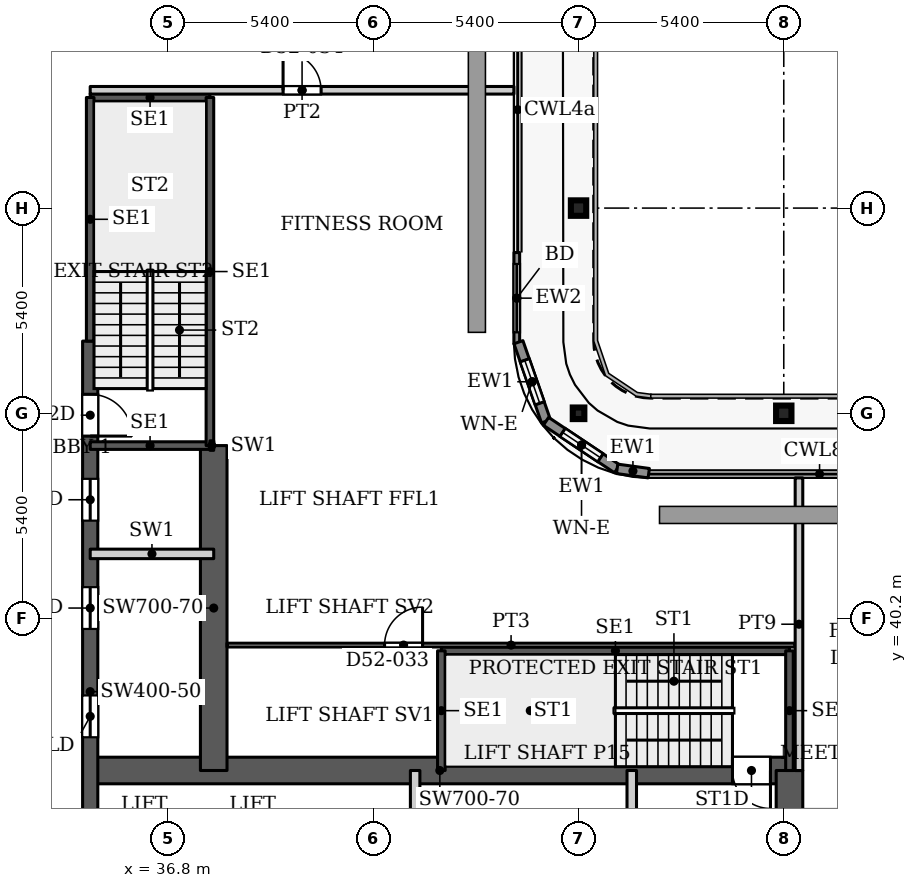
"""IFC4 building model, lengths in metres.
Left out: names, types, materials, properties, quantities, classifications, styles, units other than length and angle.
Written with IfcOpenShell. Run it as: python <this file> out.ifc"""

import sys

from ifc_helpers import new_model, si_unit, direction, frame, frame_2d, origin, origin_2d, place, context, subcontext, project, spatial, rectangle, hollow_rectangle, i_section, extrude, source, transform, mapped, element, fill, save


model = new_model("IFC4")
c1 = context("Model", 3, precision=1e-05, world=origin(), true_north=direction((0.0, 1.0)))
c2 = subcontext(c1, "Body", "Model", "MODEL_VIEW")
j1 = project(units=[si_unit("LENGTHUNIT", "METRE"), si_unit("PLANEANGLEUNIT", "RADIAN")], contexts=[c1])
p1 = place(None, origin())
s1 = spatial("IfcSite", under=j1, at=p1, CompositionType="ELEMENT")
p2 = place(p1, origin())
s2 = spatial("IfcBuilding", under=s1, at=p2, CompositionType="ELEMENT")
p3 = place(p2, frame((0.0, 0.0, 224.0)))
s3 = spatial("IfcBuildingStorey", under=s2, at=p3, CompositionType="ELEMENT", Elevation=224.0)
for number, where, z_axis, x_axis in (
    (1, (53.0, 45.6, 0.0), (0.0, 0.0, 1.0), (1.0, 0.0, 0.0)),
    (2, (47.6, 51.0, 0.0), (0.0, 0.0, 1.0), (1.0, 0.0, 0.0)),
):
    element("IfcColumn", number, at=place(p3, frame(where, z_axis=z_axis, x_axis=x_axis)), inside=s3, PredefinedType="COLUMN", context=c2, shape_type="SweptSolid", body=[
        extrude(i_section(OverallWidth=0.404, OverallDepth=0.407, WebThickness=0.027, FlangeThickness=0.044, FilletRadius=0.012, at=origin_2d()), origin(), (0.0, 0.0, 1.0), 3.9),
    ])
p4 = place(p3, frame((47.6, 45.6, 0.0), z_axis=(0.0, 0.0, 1.0), x_axis=(1.0, 0.0, 0.0)))
e3 = element("IfcColumn", 3, at=p4, inside=s3, PredefinedType="COLUMN", context=c2, shape_type="SweptSolid", body=[
    extrude(hollow_rectangle(XDim=0.305, YDim=0.305, WallThickness=0.016, InnerFilletRadius=0.016, OuterFilletRadius=0.032, at=origin_2d()), origin(), (0.0, 0.0, 1.0), 3.9),
])
p5 = place(p3, frame((34.75, 36.2, 0.0), z_axis=(0.0, 0.0, 1.0), x_axis=(1.0, 0.0, 0.0)))
e4 = element("IfcWall", 4, at=p5, inside=s3, PredefinedType="SHEAR", context=c2, shape_type="SweptSolid", body=[
    extrude(rectangle(XDim=18.4, YDim=0.7, at=frame_2d((9.2, 0.0))), origin(), (0.0, 0.0, 1.0), 3.9),
])
p6 = place(p5, frame((16.9, 0.0, 0.0)))
e5 = element("IfcOpeningElement", 5, at=p6, cuts=e4, PredefinedType="OPENING", context=c2, shape_type="SweptSolid", body=[
    extrude(rectangle(XDim=1.0, YDim=2.2, at=frame_2d((0.5, 1.1))), frame((0.0, 0.36, 0.0), z_axis=(0.0, -1.0, 0.0), x_axis=(1.0, 0.0, 0.0)), (0.0, 0.0, 1.0), 0.72),
])
p7 = place(p3, frame((34.75, 29.05, 0.0), z_axis=(0.0, 0.0, 1.0), x_axis=(0.0, 1.0, 0.0)))
e6 = element("IfcWall", 6, at=p7, inside=s3, PredefinedType="SHEAR", context=c2, shape_type="SweptSolid", body=[
    extrude(rectangle(XDim=18.45, YDim=0.4, at=frame_2d((9.225, 0.0))), origin(), (0.0, 0.0, 1.0), 3.9),
])
p8 = place(p7, frame((8.025, 0.0, 0.0)))
e7 = element("IfcOpeningElement", 7, at=p8, cuts=e6, PredefinedType="OPENING", context=c2, shape_type="SweptSolid", body=[
    extrude(rectangle(XDim=1.1, YDim=2.2, at=frame_2d((0.55, 1.1))), frame((0.0, 0.21, 0.0), z_axis=(0.0, -1.0, 0.0), x_axis=(1.0, 0.0, 0.0)), (0.0, 0.0, 1.0), 0.42),
])
p9 = place(p7, frame((10.875, 0.0, 0.0)))
e8 = element("IfcOpeningElement", 8, at=p9, cuts=e6, PredefinedType="OPENING", context=c2, shape_type="SweptSolid", body=[
    extrude(rectangle(XDim=1.1, YDim=2.2, at=frame_2d((0.55, 1.1))), frame((0.0, 0.21, 0.0), z_axis=(0.0, -1.0, 0.0), x_axis=(1.0, 0.0, 0.0)), (0.0, 0.0, 1.0), 0.42),
])
p10 = place(p7, frame((13.725, 0.0, 0.0)))
e9 = element("IfcOpeningElement", 9, at=p10, cuts=e6, PredefinedType="OPENING", context=c2, shape_type="SweptSolid", body=[
    extrude(rectangle(XDim=1.1, YDim=2.2, at=frame_2d((0.55, 1.1))), frame((0.0, 0.21, 0.0), z_axis=(0.0, -1.0, 0.0), x_axis=(1.0, 0.0, 0.0)), (0.0, 0.0, 1.0), 0.42),
])
p11 = place(p7, frame((15.95, 0.0, 0.0)))
e10 = element("IfcOpeningElement", 10, at=p11, cuts=e6, PredefinedType="OPENING", context=c2, shape_type="SweptSolid", body=[
    extrude(rectangle(XDim=1.1, YDim=2.2, at=frame_2d((0.55, 1.1))), frame((0.0, 0.21, 0.0), z_axis=(0.0, -1.0, 0.0), x_axis=(1.0, 0.0, 0.0)), (0.0, 0.0, 1.0), 0.42),
])
p12 = place(p3, frame((38.0, 36.2, 0.0), z_axis=(0.0, 0.0, 1.0), x_axis=(0.0, 1.0, 0.0)))
e11 = element("IfcWall", 11, at=p12, inside=s3, PredefinedType="SHEAR", context=c2, shape_type="SweptSolid", body=[
    extrude(rectangle(XDim=8.55, YDim=0.7, at=frame_2d((4.275, 0.0))), origin(), (0.0, 0.0, 1.0), 3.9),
])
p13 = place(p3, frame((53.15, 25.8, 0.0), z_axis=(0.0, 0.0, 1.0), x_axis=(0.0, 1.0, 0.0)))
e12 = element("IfcWall", 12, at=p13, inside=s3, PredefinedType="SHEAR", context=c2, shape_type="SweptSolid", body=[
    extrude(rectangle(XDim=10.4, YDim=0.7, at=frame_2d((5.2, 0.0))), origin(), (0.0, 0.0, 1.0), 3.9),
])
p14 = place(p3, frame((45.975, 49.83, 0.0), z_axis=(0.0, 0.0, 1.0), x_axis=(0.0, -1.0, 0.0)))
e13 = element("IfcWall", 13, at=p14, inside=s3, PredefinedType="SOLIDWALL", context=c2, shape_type="SweptSolid", body=[
    extrude(rectangle(XDim=2.4, YDim=0.15, at=frame_2d((1.2, 0.0))), origin(), (0.0, 0.0, 1.0), 3.75),
])
p15 = place(p14, frame((0.3, 0.0, 0.0)))
e14 = element("IfcOpeningElement", 14, at=p15, cuts=e13, PredefinedType="OPENING", context=c2, shape_type="SweptSolid", body=[
    extrude(rectangle(XDim=1.8, YDim=2.4, at=frame_2d((0.9, 1.2))), frame((0.0, 0.085, 0.0), z_axis=(0.0, -1.0, 0.0), x_axis=(1.0, 0.0, 0.0)), (0.0, 0.0, 1.0), 0.17),
])
p16 = place(p3, frame((46.018, 47.471, 0.0), z_axis=(0.0, 0.0, 1.0), x_axis=(0.328791208903, -0.944402637093, 0.0)))
e15 = element("IfcWall", 15, at=p16, inside=s3, PredefinedType="SOLIDWALL", context=c2, shape_type="SweptSolid", body=[
    extrude(rectangle(XDim=2.205, YDim=0.25, at=frame_2d((1.102, 0.0))), origin(), (0.0, 0.0, 1.0), 3.75),
])
p17 = place(p16, frame((0.503, 0.0, 0.6)))
e16 = element("IfcOpeningElement", 16, at=p17, cuts=e15, PredefinedType="OPENING", context=c2, shape_type="SweptSolid", body=[
    extrude(rectangle(XDim=1.2, YDim=2.1, at=frame_2d((0.6, 1.05))), frame((0.0, 0.135, 0.0), z_axis=(0.0, -1.0, 0.0), x_axis=(1.0, 0.0, 0.0)), (0.0, 0.0, 1.0), 0.27),
])
p18 = place(p3, frame((46.743, 45.389, 0.0), z_axis=(0.0, 0.0, 1.0), x_axis=(0.831449265529, -0.555600682912, 0.0)))
e17 = element("IfcWall", 17, at=p18, inside=s3, PredefinedType="SOLIDWALL", context=c2, shape_type="SweptSolid", body=[
    extrude(rectangle(XDim=2.251, YDim=0.25, at=frame_2d((1.126, 0.0))), origin(), (0.0, 0.0, 1.0), 3.75),
])
p19 = place(p18, frame((0.525, 0.0, 0.6)))
e18 = element("IfcOpeningElement", 18, at=p19, cuts=e17, PredefinedType="OPENING", context=c2, shape_type="SweptSolid", body=[
    extrude(rectangle(XDim=1.2, YDim=2.1, at=frame_2d((0.6, 1.05))), frame((0.0, 0.135, 0.0), z_axis=(0.0, -1.0, 0.0), x_axis=(1.0, 0.0, 0.0)), (0.0, 0.0, 1.0), 0.27),
])
p20 = place(p3, frame((48.615, 44.138, 0.0), z_axis=(0.0, 0.0, 1.0), x_axis=(0.990741504246, -0.135761819977, 0.0)))
e19 = element("IfcWall", 19, at=p20, inside=s3, PredefinedType="SOLIDWALL", context=c2, shape_type="SweptSolid", body=[
    extrude(rectangle(XDim=0.84, YDim=0.25, at=frame_2d((0.42, 0.0))), origin(), (0.0, 0.0, 1.0), 3.75),
])
p21 = place(p3, frame((43.99, 39.35, 0.0), z_axis=(0.0, 0.0, 1.0), x_axis=(1.0, 0.0, 0.0)))
e20 = element("IfcWall", 20, at=p21, inside=s3, PredefinedType="SHEAR", context=c2, shape_type="SweptSolid", body=[
    extrude(rectangle(XDim=9.16, YDim=0.2, at=frame_2d((4.58, 0.0))), origin(), (0.0, 0.0, 1.0), 3.9),
])
for number, where, z_axis, x_axis in (
    (21, (43.99, 36.2, 0.0), (0.0, 0.0, 1.0), (0.0, 1.0, 0.0)),
    (22, (53.15, 36.2, 0.0), (0.0, 0.0, 1.0), (0.0, 1.0, 0.0)),
):
    element("IfcWall", number, at=place(p3, frame(where, z_axis=z_axis, x_axis=x_axis)), inside=s3, PredefinedType="SHEAR", context=c2, shape_type="SweptSolid", body=[
        extrude(rectangle(XDim=3.15, YDim=0.2, at=frame_2d((1.575, 0.0))), origin(), (0.0, 0.0, 1.0), 3.9),
    ])
for number, where, z_axis, x_axis in (
    (23, (34.75, 44.75, 0.0), (0.0, 0.0, 1.0), (1.0, 0.0, 0.0)),
    (24, (34.75, 53.91, 0.0), (0.0, 0.0, 1.0), (1.0, 0.0, 0.0)),
):
    element("IfcWall", number, at=place(p3, frame(where, z_axis=z_axis, x_axis=x_axis)), inside=s3, PredefinedType="SHEAR", context=c2, shape_type="SweptSolid", body=[
        extrude(rectangle(XDim=3.15, YDim=0.2, at=frame_2d((1.575, 0.0))), origin(), (0.0, 0.0, 1.0), 3.9),
    ])
p22 = place(p3, frame((34.75, 47.5, 0.0), z_axis=(0.0, 0.0, 1.0), x_axis=(0.0, 1.0, 0.0)))
e25 = element("IfcWall", 25, at=p22, inside=s3, PredefinedType="SHEAR", context=c2, shape_type="SweptSolid", body=[
    extrude(rectangle(XDim=6.41, YDim=0.2, at=frame_2d((3.205, 0.0))), origin(), (0.0, 0.0, 1.0), 3.9),
])
p23 = place(p3, frame((37.9, 44.75, 0.0), z_axis=(0.0, 0.0, 1.0), x_axis=(0.0, 1.0, 0.0)))
e26 = element("IfcWall", 26, at=p23, inside=s3, PredefinedType="SHEAR", context=c2, shape_type="SweptSolid", body=[
    extrude(rectangle(XDim=9.16, YDim=0.2, at=frame_2d((4.58, 0.0))), origin(), (0.0, 0.0, 1.0), 3.9),
])
for number, where, z_axis, x_axis in (
    (27, (43.3, 32.95, 0.0), (0.0, 0.0, 1.0), (0.0, 1.0, 0.0)),
    (28, (49.0, 32.95, 0.0), (0.0, 0.0, 1.0), (0.0, 1.0, 0.0)),
    (29, (34.75, 41.9, 0.0), (0.0, 0.0, 1.0), (1.0, 0.0, 0.0)),
):
    element("IfcWall", number, at=place(p3, frame(where, z_axis=z_axis, x_axis=x_axis)), inside=s3, PredefinedType="PARTITIONING", context=c2, shape_type="SweptSolid", body=[
        extrude(rectangle(XDim=3.25, YDim=0.25, at=frame_2d((1.625, 0.0))), origin(), (0.0, 0.0, 1.0), 3.9),
    ])
p24 = place(p3, frame((37.9, 44.75, 0.0), z_axis=(0.0, 0.0, 1.0), x_axis=(1.0, 0.0, 0.0)))
e30 = element("IfcWall", 30, at=p24, inside=s3, PredefinedType="PARTITIONING", context=c2, shape_type="SweptSolid", body=[
    extrude(rectangle(XDim=0.1, YDim=0.25, at=frame_2d((0.05, 0.0))), origin(), (0.0, 0.0, 1.0), 3.9),
])
p25 = place(p3, frame((34.75, 54.1, 0.0), z_axis=(0.0, 0.0, 1.0), x_axis=(1.0, 0.0, 0.0)))
e31 = element("IfcWall", 31, at=p25, inside=s3, PredefinedType="PARTITIONING", context=c2, shape_type="SweptSolid", body=[
    extrude(rectangle(XDim=11.15, YDim=0.2, at=frame_2d((5.575, 0.0))), origin(), (0.0, 0.0, 1.0), 3.6),
])
p26 = place(p25, frame((5.075, 0.0, 0.0)))
e32 = element("IfcOpeningElement", 32, at=p26, cuts=e31, PredefinedType="OPENING", context=c2, shape_type="SweptSolid", body=[
    extrude(rectangle(XDim=1.0, YDim=2.1, at=frame_2d((0.5, 1.05))), frame((0.0, 0.11, 0.0), z_axis=(0.0, -1.0, 0.0), x_axis=(1.0, 0.0, 0.0)), (0.0, 0.0, 1.0), 0.22),
])
p27 = place(p3, frame((38.349, 39.5, 0.0), z_axis=(0.0, 0.0, 1.0), x_axis=(1.0, 0.0, 0.0)))
e33 = element("IfcWall", 33, at=p27, inside=s3, PredefinedType="PARTITIONING", context=c2, shape_type="SweptSolid", body=[
    extrude(rectangle(XDim=14.951, YDim=0.1, at=frame_2d((7.476, 0.0))), origin(), (0.0, 0.0, 1.0), 3.6),
])
p28 = place(p27, frame((4.147, 0.0, 0.0)))
e34 = element("IfcOpeningElement", 34, at=p28, cuts=e33, PredefinedType="OPENING", context=c2, shape_type="SweptSolid", body=[
    extrude(rectangle(XDim=1.0, YDim=2.1, at=frame_2d((0.5, 1.05))), frame((0.0, 0.06, 0.0), z_axis=(0.0, -1.0, 0.0), x_axis=(1.0, 0.0, 0.0)), (0.0, 0.0, 1.0), 0.12),
])
p29 = place(p3, frame((53.4, 36.199, 0.0), z_axis=(0.0, 0.0, 1.0), x_axis=(0.0, 1.0, 0.0)))
e35 = element("IfcWall", 35, at=p29, inside=s3, PredefinedType="PARTITIONING", context=c2, shape_type="SweptSolid", body=[
    extrude(rectangle(XDim=7.701, YDim=0.2, at=frame_2d((3.851, 0.0))), origin(), (0.0, 0.0, 1.0), 3.6),
])
m1 = source(origin(), c2, "Body", "SweptSolid", [
    extrude(rectangle(XDim=1.8, YDim=2.4, at=frame_2d((0.9, 1.2))), frame((0.0, 0.025, 0.0), z_axis=(0.0, -1.0, 0.0), x_axis=(1.0, 0.0, 0.0)), (0.0, 0.0, 1.0), 0.05),
])
p30 = place(p15, origin())
e36 = element("IfcDoor", 36, at=p30, inside=s3, OperationType="SLIDING_TO_LEFT", PredefinedType="DOOR", context=c2, shape_type="MappedRepresentation", body=[
    mapped(m1, transform((0.0, 0.0, 0.0), x_axis=(1.0, 0.0, 0.0), y_axis=(0.0, 1.0, 0.0), z_axis=(0.0, 0.0, 1.0), scale=1.0)),
])
fill(e14, e36)
m2 = source(origin(), c2, "Body", "SweptSolid", [
    extrude(rectangle(XDim=1.2, YDim=2.1, at=frame_2d((0.6, 1.05))), frame((0.0, 0.03, 0.0), z_axis=(0.0, -1.0, 0.0), x_axis=(1.0, 0.0, 0.0)), (0.0, 0.0, 1.0), 0.06),
])
p31 = place(p17, origin())
e37 = element("IfcWindow", 37, at=p31, inside=s3, PartitioningType="SINGLE_PANEL", PredefinedType="WINDOW", context=c2, shape_type="MappedRepresentation", body=[
    mapped(m2, transform((0.0, 0.0, 0.0), x_axis=(1.0, 0.0, 0.0), y_axis=(0.0, 1.0, 0.0), z_axis=(0.0, 0.0, 1.0), scale=1.0)),
])
fill(e16, e37)
p32 = place(p19, origin())
e38 = element("IfcWindow", 38, at=p32, inside=s3, PartitioningType="SINGLE_PANEL", PredefinedType="WINDOW", context=c2, shape_type="MappedRepresentation", body=[
    mapped(m2, transform((0.0, 0.0, 0.0), x_axis=(1.0, 0.0, 0.0), y_axis=(0.0, 1.0, 0.0), z_axis=(0.0, 0.0, 1.0), scale=1.0)),
])
fill(e18, e38)
m3 = source(origin(), c2, "Body", "SweptSolid", [
    extrude(rectangle(XDim=1.1, YDim=2.2, at=frame_2d((0.55, 1.1))), frame((0.0, 0.025, 0.0), z_axis=(0.0, -1.0, 0.0), x_axis=(1.0, 0.0, 0.0)), (0.0, 0.0, 1.0), 0.05),
])
p33 = place(p8, origin())
e39 = element("IfcDoor", 39, at=p33, inside=s3, OperationType="SLIDING_TO_LEFT", PredefinedType="DOOR", context=c2, shape_type="MappedRepresentation", body=[
    mapped(m3, transform((0.0, 0.0, 0.0), x_axis=(1.0, 0.0, 0.0), y_axis=(0.0, 1.0, 0.0), z_axis=(0.0, 0.0, 1.0), scale=1.0)),
])
fill(e7, e39)
p34 = place(p9, origin())
e40 = element("IfcDoor", 40, at=p34, inside=s3, OperationType="SLIDING_TO_LEFT", PredefinedType="DOOR", context=c2, shape_type="MappedRepresentation", body=[
    mapped(m3, transform((0.0, 0.0, 0.0), x_axis=(1.0, 0.0, 0.0), y_axis=(0.0, 1.0, 0.0), z_axis=(0.0, 0.0, 1.0), scale=1.0)),
])
fill(e8, e40)
p35 = place(p10, origin())
e41 = element("IfcDoor", 41, at=p35, inside=s3, OperationType="SLIDING_TO_LEFT", PredefinedType="DOOR", context=c2, shape_type="MappedRepresentation", body=[
    mapped(m3, transform((0.0, 0.0, 0.0), x_axis=(1.0, 0.0, 0.0), y_axis=(0.0, 1.0, 0.0), z_axis=(0.0, 0.0, 1.0), scale=1.0)),
])
fill(e9, e41)
m4 = source(origin(), c2, "Body", "SweptSolid", [
    extrude(rectangle(XDim=1.0, YDim=2.2, at=frame_2d((0.5, 1.1))), frame((0.0, 0.025, 0.0), z_axis=(0.0, -1.0, 0.0), x_axis=(1.0, 0.0, 0.0)), (0.0, 0.0, 1.0), 0.05),
])
p36 = place(p6, origin())
e42 = element("IfcDoor", 42, at=p36, inside=s3, OperationType="SINGLE_SWING_RIGHT", PredefinedType="DOOR", context=c2, shape_type="MappedRepresentation", body=[
    mapped(m4, transform((0.0, 0.0, 0.0), x_axis=(1.0, 0.0, 0.0), y_axis=(0.0, 1.0, 0.0), z_axis=(0.0, 0.0, 1.0), scale=1.0)),
])
fill(e5, e42)
m5 = source(origin(), c2, "Body", "SweptSolid", [
    extrude(rectangle(XDim=1.1, YDim=2.2, at=frame_2d((0.55, 1.1))), frame((0.0, 0.025, 0.0), z_axis=(0.0, -1.0, 0.0), x_axis=(1.0, 0.0, 0.0)), (0.0, 0.0, 1.0), 0.05),
])
p37 = place(p11, origin())
e43 = element("IfcDoor", 43, at=p37, inside=s3, OperationType="SINGLE_SWING_RIGHT", PredefinedType="DOOR", context=c2, shape_type="MappedRepresentation", body=[
    mapped(m5, transform((0.0, 0.0, 0.0), x_axis=(1.0, 0.0, 0.0), y_axis=(0.0, 1.0, 0.0), z_axis=(0.0, 0.0, 1.0), scale=1.0)),
])
fill(e10, e43)
m6 = source(origin(), c2, "Body", "SweptSolid", [
    extrude(rectangle(XDim=1.0, YDim=2.1, at=frame_2d((0.5, 1.05))), frame((0.0, 0.025, 0.0), z_axis=(0.0, -1.0, 0.0), x_axis=(1.0, 0.0, 0.0)), (0.0, 0.0, 1.0), 0.05),
])
p38 = place(p28, origin())
e44 = element("IfcDoor", 44, at=p38, inside=s3, OperationType="SINGLE_SWING_LEFT", PredefinedType="DOOR", context=c2, shape_type="MappedRepresentation", body=[
    mapped(m6, transform((0.0, 0.0, 0.0), x_axis=(1.0, 0.0, 0.0), y_axis=(0.0, 1.0, 0.0), z_axis=(0.0, 0.0, 1.0), scale=1.0)),
])
fill(e34, e44)
m7 = source(origin(), c2, "Body", "SweptSolid", [
    extrude(rectangle(XDim=1.0, YDim=2.1, at=frame_2d((0.5, 1.05))), frame((0.0, 0.025, 0.0), z_axis=(0.0, -1.0, 0.0), x_axis=(1.0, 0.0, 0.0)), (0.0, 0.0, 1.0), 0.05),
])
p39 = place(p26, origin())
e45 = element("IfcDoor", 45, at=p39, inside=s3, OperationType="SINGLE_SWING_LEFT", PredefinedType="DOOR", context=c2, shape_type="MappedRepresentation", body=[
    mapped(m7, transform((0.0, 0.0, 0.0), x_axis=(1.0, 0.0, 0.0), y_axis=(0.0, 1.0, 0.0), z_axis=(0.0, 0.0, 1.0), scale=1.0)),
])
fill(e32, e45)
save(model, sys.argv[1])
